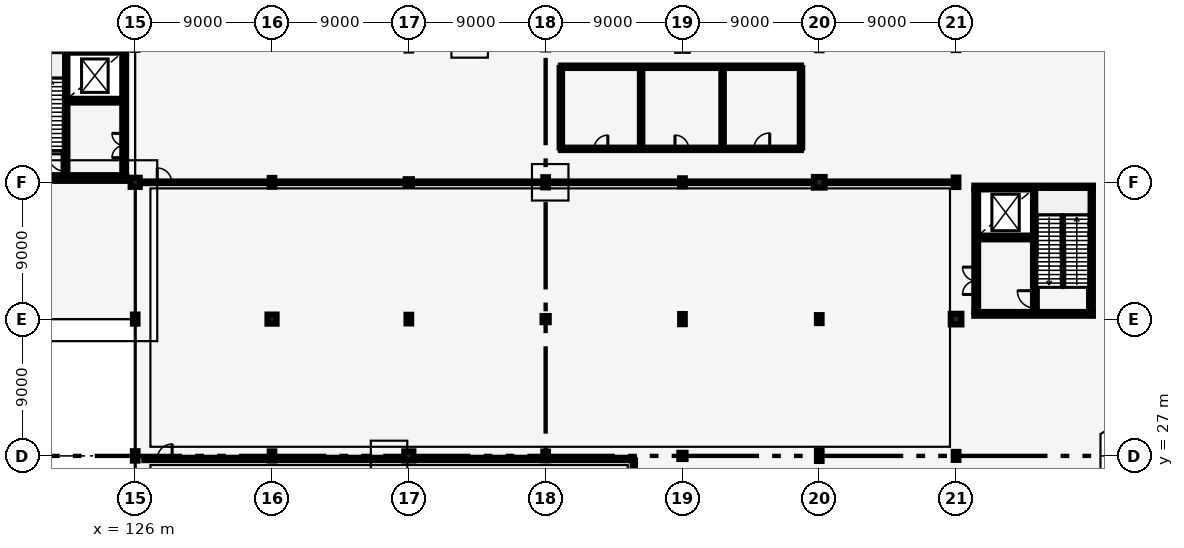
"""IFC4 building model, lengths in metres.
Left out: names, types, materials, properties, quantities, classifications, styles, units other than length and angle.
Written with IfcOpenShell. Run it as: python <this file> out.ifc"""

import sys

from ifc_helpers import new_model, si_unit, direction, frame, frame_2d, origin, origin_2d, place, context, subcontext, project, spatial, rectangle, hollow_circle, i_section, extrude, element, fill, save


model = new_model("IFC4")
c1 = context("Model", 3, precision=1e-05, world=origin(), true_north=direction((0.0, 1.0)))
c2 = subcontext(c1, "Body", "Model", "MODEL_VIEW")
j1 = project(units=[si_unit("LENGTHUNIT", "METRE"), si_unit("PLANEANGLEUNIT", "RADIAN")], contexts=[c1])
p1 = place(None, origin())
s1 = spatial("IfcSite", under=j1, at=p1, CompositionType="ELEMENT")
p2 = place(p1, origin())
s2 = spatial("IfcBuilding", under=s1, at=p2, CompositionType="ELEMENT")
p3 = place(p2, frame((0.0, 0.0, 6.0)))
s3 = spatial("IfcBuildingStorey", under=s2, at=p3, CompositionType="ELEMENT", Elevation=6.0)
p4 = place(p3, frame((126.0, 27.0, 0.0), z_axis=(0.0, 0.0, 1.0), x_axis=(1.0, 0.0, 0.0)))
e1 = element("IfcColumn", 1, at=p4, inside=s3, PredefinedType="COLUMN", context=c2, shape_type="SweptSolid", body=[
    extrude(i_section(OverallWidth=0.305, OverallDepth=0.62, WebThickness=0.021, FlangeThickness=0.04, FilletRadius=0.027, at=origin_2d()), origin(), (0.0, 0.0, 1.0), 6.0),
])
p5 = place(p3, frame((126.0, 36.0, 0.0), z_axis=(0.0, 0.0, 1.0), x_axis=(1.0, 0.0, 0.0)))
e2 = element("IfcColumn", 2, at=p5, inside=s3, PredefinedType="COLUMN", context=c2, shape_type="SweptSolid", body=[
    extrude(i_section(OverallWidth=0.3, OverallDepth=0.6, WebThickness=0.015, FlangeThickness=0.03, FilletRadius=0.027, at=origin_2d()), origin(), (0.0, 0.0, 1.0), 6.0),
])
p6 = place(p3, frame((126.0, 45.0, 0.0), z_axis=(0.0, 0.0, 1.0), x_axis=(1.0, 0.0, 0.0)))
e3 = element("IfcColumn", 3, at=p6, inside=s3, PredefinedType="COLUMN", context=c2, shape_type="SweptSolid", body=[
    extrude(rectangle(XDim=0.6, YDim=0.6, at=origin_2d()), origin(), (0.0, 0.0, 1.0), 6.0),
])
p7 = place(p3, frame((135.0, 27.0, 0.0), z_axis=(0.0, 0.0, 1.0), x_axis=(1.0, 0.0, 0.0)))
e4 = element("IfcColumn", 4, at=p7, inside=s3, PredefinedType="COLUMN", context=c2, shape_type="SweptSolid", body=[
    extrude(i_section(OverallWidth=0.3, OverallDepth=0.6, WebThickness=0.015, FlangeThickness=0.03, FilletRadius=0.027, at=origin_2d()), origin(), (0.0, 0.0, 1.0), 6.0),
])
p8 = place(p3, frame((135.0, 36.0, 0.0), z_axis=(0.0, 0.0, 1.0), x_axis=(1.0, 0.0, 0.0)))
e5 = element("IfcColumn", 5, at=p8, inside=s3, PredefinedType="COLUMN", context=c2, shape_type="SweptSolid", body=[
    extrude(rectangle(XDim=0.6, YDim=0.6, at=origin_2d()), origin(), (0.0, 0.0, 1.0), 6.0),
])
p9 = place(p3, frame((135.0, 45.0, 0.0), z_axis=(0.0, 0.0, 1.0), x_axis=(1.0, 0.0, 0.0)))
e6 = element("IfcColumn", 6, at=p9, inside=s3, PredefinedType="COLUMN", context=c2, shape_type="SweptSolid", body=[
    extrude(i_section(OverallWidth=0.306, OverallDepth=0.572, WebThickness=0.021, FlangeThickness=0.04, FilletRadius=0.027, at=origin_2d()), origin(), (0.0, 0.0, 1.0), 6.0),
])
p10 = place(p3, frame((144.0, 27.0, 0.0), z_axis=(0.0, 0.0, 1.0), x_axis=(1.0, 0.0, 0.0)))
e7 = element("IfcColumn", 7, at=p10, inside=s3, PredefinedType="COLUMN", context=c2, shape_type="SweptSolid", body=[
    extrude(rectangle(XDim=0.6, YDim=0.6, at=origin_2d()), origin(), (0.0, 0.0, 1.0), 6.0),
])
p11 = place(p3, frame((144.0, 36.0, 0.0), z_axis=(0.0, 0.0, 1.0), x_axis=(1.0, 0.0, 0.0)))
e8 = element("IfcColumn", 8, at=p11, inside=s3, PredefinedType="COLUMN", context=c2, shape_type="SweptSolid", body=[
    extrude(i_section(OverallWidth=0.306, OverallDepth=0.572, WebThickness=0.021, FlangeThickness=0.04, FilletRadius=0.027, at=origin_2d()), origin(), (0.0, 0.0, 1.0), 6.0),
])
p12 = place(p3, frame((144.0, 45.0, 0.0), z_axis=(0.0, 0.0, 1.0), x_axis=(1.0, 0.0, 0.0)))
e9 = element("IfcColumn", 9, at=p12, inside=s3, PredefinedType="COLUMN", context=c2, shape_type="SweptSolid", body=[
    extrude(hollow_circle(Radius=0.203, WallThickness=0.016, at=origin_2d()), origin(), (0.0, 0.0, 1.0), 6.0),
])
p13 = place(p3, frame((153.0, 27.0, 0.0), z_axis=(0.0, 0.0, 1.0), x_axis=(1.0, 0.0, 0.0)))
e10 = element("IfcColumn", 10, at=p13, inside=s3, PredefinedType="COLUMN", context=c2, shape_type="SweptSolid", body=[
    extrude(i_section(OverallWidth=0.306, OverallDepth=0.572, WebThickness=0.021, FlangeThickness=0.04, FilletRadius=0.027, at=origin_2d()), origin(), (0.0, 0.0, 1.0), 6.0),
])
p14 = place(p3, frame((153.0, 36.0, 0.0), z_axis=(0.0, 0.0, 1.0), x_axis=(1.0, 0.0, 0.0)))
e11 = element("IfcColumn", 11, at=p14, inside=s3, PredefinedType="COLUMN", context=c2, shape_type="SweptSolid", body=[
    extrude(hollow_circle(Radius=0.203, WallThickness=0.016, at=origin_2d()), origin(), (0.0, 0.0, 1.0), 6.0),
])
p15 = place(p3, frame((153.0, 45.0, 0.0), z_axis=(0.0, 0.0, 1.0), x_axis=(1.0, 0.0, 0.0)))
e12 = element("IfcColumn", 12, at=p15, inside=s3, PredefinedType="COLUMN", context=c2, shape_type="SweptSolid", body=[
    extrude(i_section(OverallWidth=0.305, OverallDepth=0.668, WebThickness=0.021, FlangeThickness=0.04, FilletRadius=0.027, at=origin_2d()), origin(), (0.0, 0.0, 1.0), 6.0),
])
p16 = place(p3, frame((162.0, 27.0, 0.0), z_axis=(0.0, 0.0, 1.0), x_axis=(1.0, 0.0, 0.0)))
e13 = element("IfcColumn", 13, at=p16, inside=s3, PredefinedType="COLUMN", context=c2, shape_type="SweptSolid", body=[
    extrude(hollow_circle(Radius=0.203, WallThickness=0.016, at=origin_2d()), origin(), (0.0, 0.0, 1.0), 6.0),
])
p17 = place(p3, frame((162.0, 36.0, 0.0), z_axis=(0.0, 0.0, 1.0), x_axis=(1.0, 0.0, 0.0)))
e14 = element("IfcColumn", 14, at=p17, inside=s3, PredefinedType="COLUMN", context=c2, shape_type="SweptSolid", body=[
    extrude(i_section(OverallWidth=0.305, OverallDepth=0.668, WebThickness=0.021, FlangeThickness=0.04, FilletRadius=0.027, at=origin_2d()), origin(), (0.0, 0.0, 1.0), 6.0),
])
p18 = place(p3, frame((162.0, 45.0, 0.0), z_axis=(0.0, 0.0, 1.0), x_axis=(1.0, 0.0, 0.0)))
e15 = element("IfcColumn", 15, at=p18, inside=s3, PredefinedType="COLUMN", context=c2, shape_type="SweptSolid", body=[
    extrude(i_section(OverallWidth=0.306, OverallDepth=0.524, WebThickness=0.021, FlangeThickness=0.04, FilletRadius=0.027, at=origin_2d()), origin(), (0.0, 0.0, 1.0), 6.0),
])
p19 = place(p3, frame((171.0, 27.0, 0.0), z_axis=(0.0, 0.0, 1.0), x_axis=(1.0, 0.0, 0.0)))
e16 = element("IfcColumn", 16, at=p19, inside=s3, PredefinedType="COLUMN", context=c2, shape_type="SweptSolid", body=[
    extrude(i_section(OverallWidth=0.305, OverallDepth=0.668, WebThickness=0.021, FlangeThickness=0.04, FilletRadius=0.027, at=origin_2d()), origin(), (0.0, 0.0, 1.0), 6.0),
])
p20 = place(p3, frame((171.0, 36.0, 0.0), z_axis=(0.0, 0.0, 1.0), x_axis=(1.0, 0.0, 0.0)))
e17 = element("IfcColumn", 17, at=p20, inside=s3, PredefinedType="COLUMN", context=c2, shape_type="SweptSolid", body=[
    extrude(i_section(OverallWidth=0.306, OverallDepth=0.524, WebThickness=0.021, FlangeThickness=0.04, FilletRadius=0.027, at=origin_2d()), origin(), (0.0, 0.0, 1.0), 6.0),
])
p21 = place(p3, frame((171.0, 45.0, 0.0), z_axis=(0.0, 0.0, 1.0), x_axis=(1.0, 0.0, 0.0)))
e18 = element("IfcColumn", 18, at=p21, inside=s3, PredefinedType="COLUMN", context=c2, shape_type="SweptSolid", body=[
    extrude(rectangle(XDim=0.7, YDim=0.7, at=origin_2d()), origin(), (0.0, 0.0, 1.0), 6.0),
])
p22 = place(p3, frame((180.0, 27.0, 0.0), z_axis=(0.0, 0.0, 1.0), x_axis=(1.0, 0.0, 0.0)))
e19 = element("IfcColumn", 19, at=p22, inside=s3, PredefinedType="COLUMN", context=c2, shape_type="SweptSolid", body=[
    extrude(i_section(OverallWidth=0.306, OverallDepth=0.524, WebThickness=0.021, FlangeThickness=0.04, FilletRadius=0.027, at=origin_2d()), origin(), (0.0, 0.0, 1.0), 6.0),
])
p23 = place(p3, frame((180.0, 36.0, 0.0), z_axis=(0.0, 0.0, 1.0), x_axis=(1.0, 0.0, 0.0)))
e20 = element("IfcColumn", 20, at=p23, inside=s3, PredefinedType="COLUMN", context=c2, shape_type="SweptSolid", body=[
    extrude(rectangle(XDim=0.7, YDim=0.7, at=origin_2d()), origin(), (0.0, 0.0, 1.0), 6.0),
])
p24 = place(p3, frame((180.0, 45.0, 0.0), z_axis=(0.0, 0.0, 1.0), x_axis=(1.0, 0.0, 0.0)))
e21 = element("IfcColumn", 21, at=p24, inside=s3, PredefinedType="COLUMN", context=c2, shape_type="SweptSolid", body=[
    extrude(i_section(OverallWidth=0.305, OverallDepth=0.62, WebThickness=0.021, FlangeThickness=0.04, FilletRadius=0.027, at=origin_2d()), origin(), (0.0, 0.0, 1.0), 6.0),
])
p25 = place(p3, frame((125.275, 45.47, 0.0), z_axis=(0.0, 0.0, 1.0), x_axis=(0.0, 1.0, 0.0)))
e22 = element("IfcWall", 22, at=p25, inside=s3, PredefinedType="SHEAR", context=c2, shape_type="SweptSolid", body=[
    extrude(rectangle(XDim=8.06, YDim=0.25, at=frame_2d((4.03, 0.0))), origin(), (0.0, 0.0, 1.0), 5.71),
])
p26 = place(p25, frame((1.15, 0.0, 0.0)))
e23 = element("IfcOpeningElement", 23, at=p26, cuts=e22, PredefinedType="OPENING", context=c2, shape_type="SweptSolid", body=[
    extrude(rectangle(XDim=1.6, YDim=2.2, at=frame_2d((0.8, 1.1))), frame((0.0, 0.135, 0.0), z_axis=(0.0, -1.0, 0.0), x_axis=(1.0, 0.0, 0.0)), (0.0, 0.0, 1.0), 0.27),
])
for number, where, z_axis, x_axis in (
    (24, (117.6, 45.345, 0.0), (0.0, 0.0, 1.0), (1.0, 0.0, 0.0)),
    (25, (117.6, 53.655, 0.0), (0.0, 0.0, 1.0), (1.0, 0.0, 0.0)),
):
    element("IfcWall", number, at=place(p3, frame(where, z_axis=z_axis, x_axis=x_axis)), inside=s3, PredefinedType="SHEAR", context=c2, shape_type="SweptSolid", body=[
        extrude(rectangle(XDim=7.8, YDim=0.25, at=frame_2d((3.9, 0.0))), origin(), (0.0, 0.0, 1.0), 5.71),
    ])
p27 = place(p3, frame((121.415, 45.47, 0.0), z_axis=(0.0, 0.0, 1.0), x_axis=(0.0, 1.0, 0.0)))
e26 = element("IfcWall", 26, at=p27, inside=s3, PredefinedType="SHEAR", context=c2, shape_type="SweptSolid", body=[
    extrude(rectangle(XDim=8.06, YDim=0.25, at=frame_2d((4.03, 0.0))), origin(), (0.0, 0.0, 1.0), 5.71),
])
p28 = place(p27, frame((0.25, 0.0, 0.0)))
e27 = element("IfcOpeningElement", 27, at=p28, cuts=e26, PredefinedType="OPENING", context=c2, shape_type="SweptSolid", body=[
    extrude(rectangle(XDim=1.15, YDim=2.15, at=frame_2d((0.575, 1.075))), frame((0.0, 0.135, 0.0), z_axis=(0.0, -1.0, 0.0), x_axis=(1.0, 0.0, 0.0)), (0.0, 0.0, 1.0), 0.27),
])
p29 = place(p3, frame((121.54, 50.37, 0.0), z_axis=(0.0, 0.0, 1.0), x_axis=(1.0, 0.0, 0.0)))
e28 = element("IfcWall", 28, at=p29, inside=s3, PredefinedType="SHEAR", context=c2, shape_type="SweptSolid", body=[
    extrude(rectangle(XDim=3.61, YDim=0.25, at=frame_2d((1.805, 0.0))), origin(), (0.0, 0.0, 1.0), 5.71),
])
p30 = place(p29, frame((0.95, 0.0, 0.0)))
e29 = element("IfcOpeningElement", 29, at=p30, cuts=e28, PredefinedType="OPENING", context=c2, shape_type="SweptSolid", body=[
    extrude(rectangle(XDim=1.2, YDim=2.2, at=frame_2d((0.6, 1.1))), frame((0.0, 0.135, 0.0), z_axis=(0.0, -1.0, 0.0), x_axis=(1.0, 0.0, 0.0)), (0.0, 0.0, 1.0), 0.27),
])
p31 = place(p3, frame((181.325, 36.47, 0.0), z_axis=(0.0, 0.0, 1.0), x_axis=(0.0, 1.0, 0.0)))
e30 = element("IfcWall", 30, at=p31, inside=s3, PredefinedType="SHEAR", context=c2, shape_type="SweptSolid", body=[
    extrude(rectangle(XDim=8.06, YDim=0.25, at=frame_2d((4.03, 0.0))), origin(), (0.0, 0.0, 1.0), 5.63),
])
p32 = place(p31, frame((1.15, 0.0, 0.0)))
e31 = element("IfcOpeningElement", 31, at=p32, cuts=e30, PredefinedType="OPENING", context=c2, shape_type="SweptSolid", body=[
    extrude(rectangle(XDim=1.8, YDim=2.2, at=frame_2d((0.9, 1.1))), frame((0.0, 0.135, 0.0), z_axis=(0.0, -1.0, 0.0), x_axis=(1.0, 0.0, 0.0)), (0.0, 0.0, 1.0), 0.27),
])
p33 = place(p3, frame((188.875, 36.47, 0.0), z_axis=(0.0, 0.0, 1.0), x_axis=(0.0, 1.0, 0.0)))
e32 = element("IfcWall", 32, at=p33, inside=s3, PredefinedType="SHEAR", context=c2, shape_type="SweptSolid", body=[
    extrude(rectangle(XDim=8.06, YDim=0.25, at=frame_2d((4.03, 0.0))), origin(), (0.0, 0.0, 1.0), 5.63),
])
for number, where, z_axis, x_axis in (
    (33, (181.2, 36.345, 0.0), (0.0, 0.0, 1.0), (1.0, 0.0, 0.0)),
    (34, (181.2, 44.655, 0.0), (0.0, 0.0, 1.0), (1.0, 0.0, 0.0)),
):
    element("IfcWall", number, at=place(p3, frame(where, z_axis=z_axis, x_axis=x_axis)), inside=s3, PredefinedType="SHEAR", context=c2, shape_type="SweptSolid", body=[
        extrude(rectangle(XDim=7.8, YDim=0.25, at=frame_2d((3.9, 0.0))), origin(), (0.0, 0.0, 1.0), 5.63),
    ])
p34 = place(p3, frame((185.185, 36.47, 0.0), z_axis=(0.0, 0.0, 1.0), x_axis=(0.0, 1.0, 0.0)))
e35 = element("IfcWall", 35, at=p34, inside=s3, PredefinedType="SHEAR", context=c2, shape_type="SweptSolid", body=[
    extrude(rectangle(XDim=8.06, YDim=0.25, at=frame_2d((4.03, 0.0))), origin(), (0.0, 0.0, 1.0), 5.63),
])
p35 = place(p34, frame((0.25, 0.0, 0.0)))
e36 = element("IfcOpeningElement", 36, at=p35, cuts=e35, PredefinedType="OPENING", context=c2, shape_type="SweptSolid", body=[
    extrude(rectangle(XDim=1.15, YDim=2.15, at=frame_2d((0.575, 1.075))), frame((0.0, 0.135, 0.0), z_axis=(0.0, -1.0, 0.0), x_axis=(1.0, 0.0, 0.0)), (0.0, 0.0, 1.0), 0.27),
])
p36 = place(p3, frame((181.45, 41.37, 0.0), z_axis=(0.0, 0.0, 1.0), x_axis=(1.0, 0.0, 0.0)))
e37 = element("IfcWall", 37, at=p36, inside=s3, PredefinedType="SHEAR", context=c2, shape_type="SweptSolid", body=[
    extrude(rectangle(XDim=3.61, YDim=0.25, at=frame_2d((1.805, 0.0))), origin(), (0.0, 0.0, 1.0), 5.63),
])
p37 = place(p36, frame((0.95, 0.0, 0.0)))
e38 = element("IfcOpeningElement", 38, at=p37, cuts=e37, PredefinedType="OPENING", context=c2, shape_type="SweptSolid", body=[
    extrude(rectangle(XDim=1.2, YDim=2.2, at=frame_2d((0.6, 1.1))), frame((0.0, 0.135, 0.0), z_axis=(0.0, -1.0, 0.0), x_axis=(1.0, 0.0, 0.0)), (0.0, 0.0, 1.0), 0.27),
])
p38 = place(p3, frame((154.0, 47.2, 0.0), z_axis=(0.0, 0.0, 1.0), x_axis=(1.0, 0.0, 0.0)))
e39 = element("IfcWall", 39, at=p38, inside=s3, PredefinedType="PLUMBINGWALL", context=c2, shape_type="SweptSolid", body=[
    extrude(rectangle(XDim=15.8, YDim=0.16, at=frame_2d((7.9, 0.0))), origin(), (0.0, 0.0, 1.0), 4.85),
])
p39 = place(p38, frame((2.19, 0.0, 0.0)))
e40 = element("IfcOpeningElement", 40, at=p39, cuts=e39, PredefinedType="OPENING", context=c2, shape_type="SweptSolid", body=[
    extrude(rectangle(XDim=0.9, YDim=2.1, at=frame_2d((0.45, 1.05))), frame((0.0, 0.09, 0.0), z_axis=(0.0, -1.0, 0.0), x_axis=(1.0, 0.0, 0.0)), (0.0, 0.0, 1.0), 0.18),
])
p40 = place(p38, frame((7.51, 0.0, 0.0)))
e41 = element("IfcOpeningElement", 41, at=p40, cuts=e39, PredefinedType="OPENING", context=c2, shape_type="SweptSolid", body=[
    extrude(rectangle(XDim=0.9, YDim=2.1, at=frame_2d((0.45, 1.05))), frame((0.0, 0.09, 0.0), z_axis=(0.0, -1.0, 0.0), x_axis=(1.0, 0.0, 0.0)), (0.0, 0.0, 1.0), 0.18),
])
p41 = place(p38, frame((12.7, 0.0, 0.0)))
e42 = element("IfcOpeningElement", 42, at=p41, cuts=e39, PredefinedType="OPENING", context=c2, shape_type="SweptSolid", body=[
    extrude(rectangle(XDim=1.04, YDim=2.15, at=frame_2d((0.52, 1.075))), frame((0.0, 0.09, 0.0), z_axis=(0.0, -1.0, 0.0), x_axis=(1.0, 0.0, 0.0)), (0.0, 0.0, 1.0), 0.18),
])
p42 = place(p3, frame((154.0, 52.6, 0.0), z_axis=(0.0, 0.0, 1.0), x_axis=(1.0, 0.0, 0.0)))
e43 = element("IfcWall", 43, at=p42, inside=s3, PredefinedType="PLUMBINGWALL", context=c2, shape_type="SweptSolid", body=[
    extrude(rectangle(XDim=15.8, YDim=0.16, at=frame_2d((7.9, 0.0))), origin(), (0.0, 0.0, 1.0), 4.85),
])
for number, where, z_axis, x_axis in (
    (44, (154.0, 47.288, 0.0), (0.0, 0.0, 1.0), (0.0, 1.0, 0.0)),
    (45, (159.28, 47.288, 0.0), (0.0, 0.0, 1.0), (0.0, 1.0, 0.0)),
    (46, (164.64, 47.288, 0.0), (0.0, 0.0, 1.0), (0.0, 1.0, 0.0)),
    (47, (169.8, 47.288, 0.0), (0.0, 0.0, 1.0), (0.0, 1.0, 0.0)),
):
    element("IfcWall", number, at=place(p3, frame(where, z_axis=z_axis, x_axis=x_axis)), inside=s3, PredefinedType="PLUMBINGWALL", context=c2, shape_type="SweptSolid", body=[
        extrude(rectangle(XDim=5.224, YDim=0.16, at=frame_2d((2.612, 0.0))), origin(), (0.0, 0.0, 1.0), 4.85),
    ])
p43 = place(p3, frame((126.6, 26.8, 0.0), z_axis=(0.0, 0.0, 1.0), x_axis=(1.0, 0.0, 0.0)))
e48 = element("IfcWall", 48, at=p43, inside=s3, PredefinedType="PARTITIONING", context=c2, shape_type="SweptSolid", body=[
    extrude(rectangle(XDim=32.2, YDim=0.155, at=frame_2d((16.1, 0.0))), origin(), (0.0, 0.0, 1.0), 4.85),
])
p44 = place(p43, frame((0.85, 0.0, 0.0)))
e49 = element("IfcOpeningElement", 49, at=p44, cuts=e48, PredefinedType="OPENING", context=c2, shape_type="SweptSolid", body=[
    extrude(rectangle(XDim=0.98, YDim=2.12, at=frame_2d((0.49, 1.06))), frame((0.0, 0.087, 0.0), z_axis=(0.0, -1.0, 0.0), x_axis=(1.0, 0.0, 0.0)), (0.0, 0.0, 1.0), 0.175),
])
p45 = place(p3, frame((158.8, 0.693, 0.0), z_axis=(0.0, 0.0, 1.0), x_axis=(0.0, 1.0, 0.0)))
e50 = element("IfcWall", 50, at=p45, inside=s3, PredefinedType="PARTITIONING", context=c2, shape_type="SweptSolid", body=[
    extrude(rectangle(XDim=26.014, YDim=0.155, at=frame_2d((13.007, 0.0))), origin(), (0.0, 0.0, 1.0), 4.85),
])
p46 = place(p3, frame((126.6, 45.0, 0.0), z_axis=(0.0, 0.0, 1.0), x_axis=(1.0, 0.0, 0.0)))
e51 = element("IfcWall", 51, at=p46, inside=s3, PredefinedType="PARTITIONING", context=c2, shape_type="SweptSolid", body=[
    extrude(rectangle(XDim=53.4, YDim=0.11, at=frame_2d((26.7, 0.0))), origin(), (0.0, 0.0, 1.0), 4.85),
])
p47 = place(p46, frame((0.85, 0.0, 0.0)))
e52 = element("IfcOpeningElement", 52, at=p47, cuts=e51, PredefinedType="OPENING", context=c2, shape_type="SweptSolid", body=[
    extrude(rectangle(XDim=0.94, YDim=2.1, at=frame_2d((0.47, 1.05))), frame((0.0, 0.065, 0.0), z_axis=(0.0, -1.0, 0.0), x_axis=(1.0, 0.0, 0.0)), (0.0, 0.0, 1.0), 0.13),
])
p48 = place(p28, origin())
e53 = element("IfcDoor", 53, at=p48, inside=s3, OperationType="SINGLE_SWING_RIGHT", PredefinedType="DOOR", context=c2, shape_type="SweptSolid", body=[
    extrude(rectangle(XDim=1.15, YDim=2.15, at=frame_2d((0.575, 1.075))), frame((0.0, 0.025, 0.0), z_axis=(0.0, -1.0, 0.0), x_axis=(1.0, 0.0, 0.0)), (0.0, 0.0, 1.0), 0.05),
])
fill(e27, e53)
p49 = place(p30, origin())
e54 = element("IfcDoor", 54, at=p49, inside=s3, OperationType="DOUBLE_DOOR_SLIDING", PredefinedType="DOOR", context=c2, shape_type="SweptSolid", body=[
    extrude(rectangle(XDim=1.2, YDim=2.2, at=frame_2d((0.6, 1.1))), frame((0.0, 0.025, 0.0), z_axis=(0.0, -1.0, 0.0), x_axis=(1.0, 0.0, 0.0)), (0.0, 0.0, 1.0), 0.05),
])
fill(e29, e54)
p50 = place(p26, origin())
e55 = element("IfcDoor", 55, at=p50, inside=s3, OperationType="DOUBLE_DOOR_SINGLE_SWING", PredefinedType="DOOR", context=c2, shape_type="SweptSolid", body=[
    extrude(rectangle(XDim=1.6, YDim=2.2, at=frame_2d((0.8, 1.1))), frame((0.0, 0.025, 0.0), z_axis=(0.0, -1.0, 0.0), x_axis=(1.0, 0.0, 0.0)), (0.0, 0.0, 1.0), 0.05),
])
fill(e23, e55)
p51 = place(p35, origin())
e56 = element("IfcDoor", 56, at=p51, inside=s3, OperationType="SINGLE_SWING_RIGHT", PredefinedType="DOOR", context=c2, shape_type="SweptSolid", body=[
    extrude(rectangle(XDim=1.15, YDim=2.15, at=frame_2d((0.575, 1.075))), frame((0.0, 0.025, 0.0), z_axis=(0.0, -1.0, 0.0), x_axis=(1.0, 0.0, 0.0)), (0.0, 0.0, 1.0), 0.05),
])
fill(e36, e56)
p52 = place(p37, origin())
e57 = element("IfcDoor", 57, at=p52, inside=s3, OperationType="DOUBLE_DOOR_SLIDING", PredefinedType="DOOR", context=c2, shape_type="SweptSolid", body=[
    extrude(rectangle(XDim=1.2, YDim=2.2, at=frame_2d((0.6, 1.1))), frame((0.0, 0.025, 0.0), z_axis=(0.0, -1.0, 0.0), x_axis=(1.0, 0.0, 0.0)), (0.0, 0.0, 1.0), 0.05),
])
fill(e38, e57)
p53 = place(p32, origin())
e58 = element("IfcDoor", 58, at=p53, inside=s3, OperationType="DOUBLE_DOOR_SINGLE_SWING", PredefinedType="DOOR", context=c2, shape_type="SweptSolid", body=[
    extrude(rectangle(XDim=1.8, YDim=2.2, at=frame_2d((0.9, 1.1))), frame((0.0, 0.025, 0.0), z_axis=(0.0, -1.0, 0.0), x_axis=(1.0, 0.0, 0.0)), (0.0, 0.0, 1.0), 0.05),
])
fill(e31, e58)
p54 = place(p39, origin())
e59 = element("IfcDoor", 59, at=p54, inside=s3, OperationType="SINGLE_SWING_RIGHT", PredefinedType="DOOR", context=c2, shape_type="SweptSolid", body=[
    extrude(rectangle(XDim=0.9, YDim=2.1, at=frame_2d((0.45, 1.05))), frame((0.0, 0.025, 0.0), z_axis=(0.0, -1.0, 0.0), x_axis=(1.0, 0.0, 0.0)), (0.0, 0.0, 1.0), 0.05),
])
fill(e40, e59)
p55 = place(p40, origin())
e60 = element("IfcDoor", 60, at=p55, inside=s3, OperationType="SINGLE_SWING_LEFT", PredefinedType="DOOR", context=c2, shape_type="SweptSolid", body=[
    extrude(rectangle(XDim=0.9, YDim=2.1, at=frame_2d((0.45, 1.05))), frame((0.0, 0.025, 0.0), z_axis=(0.0, -1.0, 0.0), x_axis=(1.0, 0.0, 0.0)), (0.0, 0.0, 1.0), 0.05),
])
fill(e41, e60)
p56 = place(p41, origin())
e61 = element("IfcDoor", 61, at=p56, inside=s3, OperationType="SINGLE_SWING_RIGHT", PredefinedType="DOOR", context=c2, shape_type="SweptSolid", body=[
    extrude(rectangle(XDim=1.04, YDim=2.15, at=frame_2d((0.52, 1.075))), frame((0.0, 0.025, 0.0), z_axis=(0.0, -1.0, 0.0), x_axis=(1.0, 0.0, 0.0)), (0.0, 0.0, 1.0), 0.05),
])
fill(e42, e61)
p57 = place(p44, origin())
e62 = element("IfcDoor", 62, at=p57, inside=s3, OperationType="SINGLE_SWING_RIGHT", PredefinedType="DOOR", context=c2, shape_type="SweptSolid", body=[
    extrude(rectangle(XDim=0.98, YDim=2.12, at=frame_2d((0.49, 1.06))), frame((0.0, 0.025, 0.0), z_axis=(0.0, -1.0, 0.0), x_axis=(1.0, 0.0, 0.0)), (0.0, 0.0, 1.0), 0.05),
])
fill(e49, e62)
p58 = place(p47, origin())
e63 = element("IfcDoor", 63, at=p58, inside=s3, OperationType="SINGLE_SWING_LEFT", PredefinedType="DOOR", context=c2, shape_type="SweptSolid", body=[
    extrude(rectangle(XDim=0.94, YDim=2.1, at=frame_2d((0.47, 1.05))), frame((0.0, 0.025, 0.0), z_axis=(0.0, -1.0, 0.0), x_axis=(1.0, 0.0, 0.0)), (0.0, 0.0, 1.0), 0.05),
])
fill(e52, e63)
save(model, sys.argv[1])
